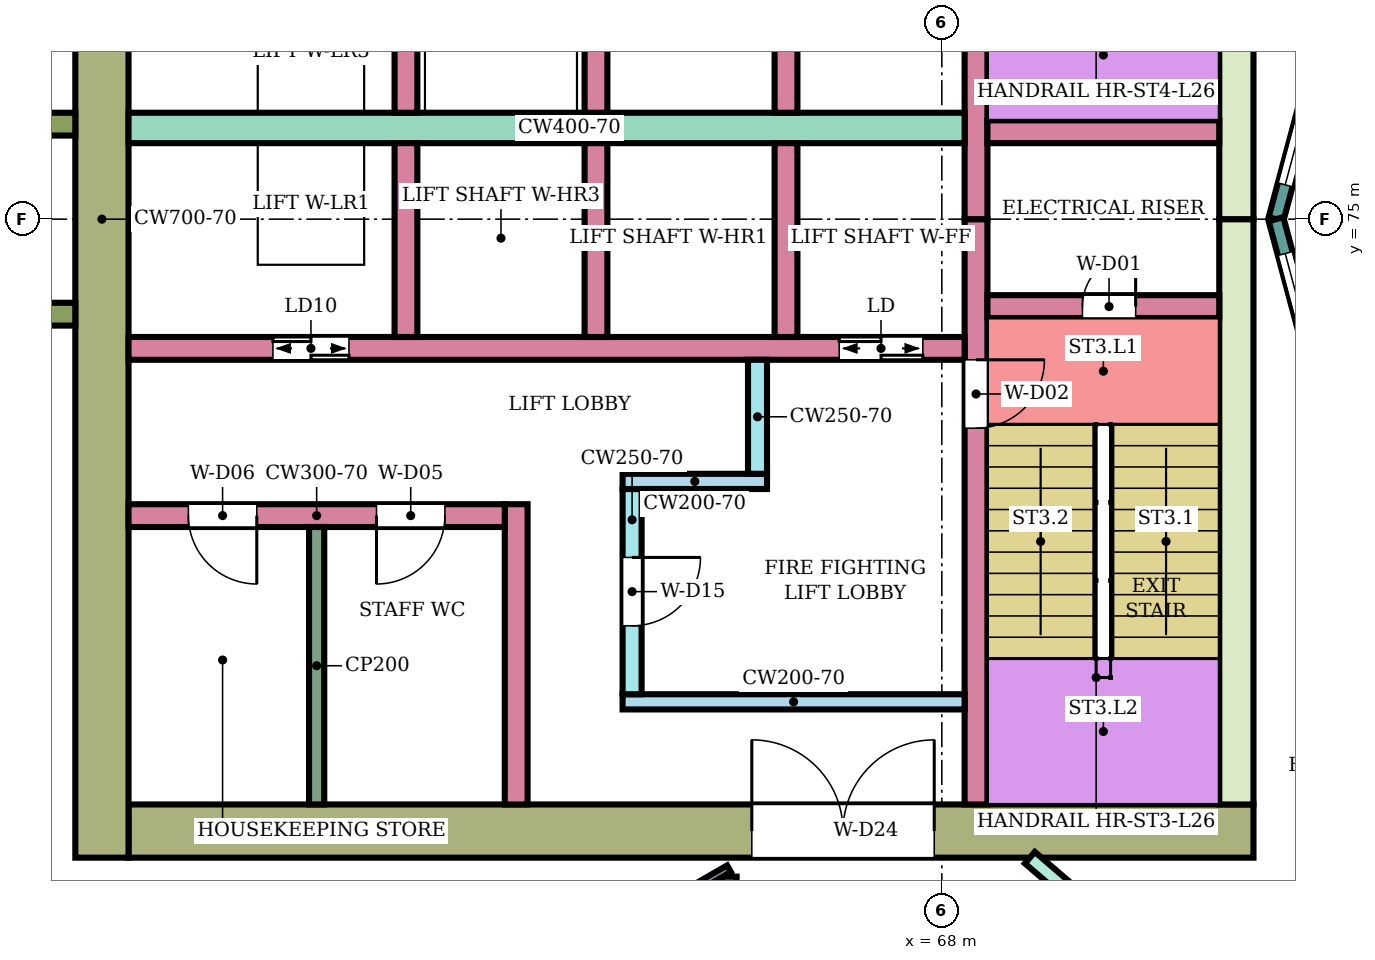
"""IFC4 building model, lengths in metres.
Left out: names, types, materials, properties, quantities, classifications, styles, units other than length and angle.
Written with IfcOpenShell. Run it as: python <this file> out.ifc"""

import sys

from ifc_helpers import new_model, si_unit, direction, frame, frame_2d, origin, place, context, subcontext, project, spatial, rectangle, extrude, element, fill, save


model = new_model("IFC4")
c1 = context("Model", 3, precision=1e-05, world=origin(), true_north=direction((0.0, 1.0)))
c2 = subcontext(c1, "Body", "Model", "MODEL_VIEW")
j1 = project(units=[si_unit("LENGTHUNIT", "METRE"), si_unit("PLANEANGLEUNIT", "RADIAN")], contexts=[c1])
p1 = place(None, origin())
s1 = spatial("IfcSite", under=j1, at=p1, CompositionType="ELEMENT")
p2 = place(p1, origin())
s2 = spatial("IfcBuilding", under=s1, at=p2, CompositionType="ELEMENT")
p3 = place(p2, frame((0.0, 0.0, 114.6)))
s3 = spatial("IfcBuildingStorey", under=s2, at=p3, CompositionType="ELEMENT", Elevation=114.6)
p4 = place(p3, frame((72.1, 66.95, 0.0), z_axis=(0.0, 0.0, 1.0), x_axis=(-1.0, 0.0, 0.0)))
e1 = element("IfcWall", 1, at=p4, inside=s3, PredefinedType="SHEAR", context=c2, shape_type="SweptSolid", body=[
    extrude(rectangle(XDim=14.8, YDim=0.7, at=frame_2d((7.4, 0.0))), origin(), (0.0, 0.0, 1.0), 3.58),
])
p5 = place(p4, frame((4.2, 0.0, 0.0)))
e2 = element("IfcOpeningElement", 2, at=p5, cuts=e1, PredefinedType="OPENING", context=c2, shape_type="SweptSolid", body=[
    extrude(rectangle(XDim=2.4, YDim=2.4, at=frame_2d((1.2, 1.2))), frame((0.0, 0.36, 0.0), z_axis=(0.0, -1.0, 0.0), x_axis=(1.0, 0.0, 0.0)), (0.0, 0.0, 1.0), 0.72),
])
for number, where, z_axis, x_axis in (
    (3, (71.875, 75.0, 0.0), (0.0, 0.0, 1.0), (0.0, -1.0, 0.0)),
    (4, (71.875, 82.7, 0.0), (0.0, 0.0, 1.0), (0.0, -1.0, 0.0)),
):
    element("IfcWall", number, at=place(p3, frame(where, z_axis=z_axis, x_axis=x_axis)), inside=s3, PredefinedType="SHEAR", context=c2, shape_type="SweptSolid", body=[
        extrude(rectangle(XDim=7.7, YDim=0.45, at=frame_2d((3.85, 0.0))), origin(), (0.0, 0.0, 1.0), 3.58),
    ])
p6 = place(p3, frame((56.95, 83.4, 0.0), z_axis=(0.0, 0.0, 1.0), x_axis=(0.0, -1.0, 0.0)))
e5 = element("IfcWall", 5, at=p6, inside=s3, PredefinedType="SHEAR", context=c2, shape_type="SweptSolid", body=[
    extrude(rectangle(XDim=16.8, YDim=0.7, at=frame_2d((8.4, 0.0))), origin(), (0.0, 0.0, 1.0), 3.58),
])
p7 = place(p3, frame((68.45, 75.0, 0.0), z_axis=(0.0, 0.0, 1.0), x_axis=(0.0, -1.0, 0.0)))
e6 = element("IfcWall", 6, at=p7, inside=s3, PredefinedType="SHEAR", context=c2, shape_type="SweptSolid", body=[
    extrude(rectangle(XDim=7.7, YDim=0.3, at=frame_2d((3.85, 0.0))), origin(), (0.0, 0.0, 1.0), 3.58),
])
p8 = place(p7, frame((1.85, 0.0, 0.0)))
e7 = element("IfcOpeningElement", 7, at=p8, cuts=e6, PredefinedType="OPENING", context=c2, shape_type="SweptSolid", body=[
    extrude(rectangle(XDim=0.9, YDim=2.1, at=frame_2d((0.45, 1.05))), frame((0.0, 0.16, 0.0), z_axis=(0.0, -1.0, 0.0), x_axis=(1.0, 0.0, 0.0)), (0.0, 0.0, 1.0), 0.32),
])
p9 = place(p3, frame((68.45, 82.7, 0.0), z_axis=(0.0, 0.0, 1.0), x_axis=(0.0, -1.0, 0.0)))
e8 = element("IfcWall", 8, at=p9, inside=s3, PredefinedType="SHEAR", context=c2, shape_type="SweptSolid", body=[
    extrude(rectangle(XDim=7.7, YDim=0.3, at=frame_2d((3.85, 0.0))), origin(), (0.0, 0.0, 1.0), 3.58),
])
p10 = place(p9, frame((0.35, 0.0, 0.0)))
e9 = element("IfcOpeningElement", 9, at=p10, cuts=e8, PredefinedType="OPENING", context=c2, shape_type="SweptSolid", body=[
    extrude(rectangle(XDim=0.9, YDim=2.1, at=frame_2d((0.45, 1.05))), frame((0.0, 0.16, 0.0), z_axis=(0.0, -1.0, 0.0), x_axis=(1.0, 0.0, 0.0)), (0.0, 0.0, 1.0), 0.32),
])
p11 = place(p3, frame((71.65, 73.85, 0.0), z_axis=(0.0, 0.0, 1.0), x_axis=(-1.0, 0.0, 0.0)))
e10 = element("IfcWall", 10, at=p11, inside=s3, PredefinedType="SHEAR", context=c2, shape_type="SweptSolid", body=[
    extrude(rectangle(XDim=3.05, YDim=0.3, at=frame_2d((1.525, 0.0))), origin(), (0.0, 0.0, 1.0), 3.58),
])
p12 = place(p11, frame((1.1, 0.0, 0.0)))
e11 = element("IfcOpeningElement", 11, at=p12, cuts=e10, PredefinedType="OPENING", context=c2, shape_type="SweptSolid", body=[
    extrude(rectangle(XDim=0.7, YDim=2.0, at=frame_2d((0.35, 1.0))), frame((0.0, 0.16, 0.0), z_axis=(0.0, -1.0, 0.0), x_axis=(1.0, 0.0, 0.0)), (0.0, 0.0, 1.0), 0.32),
])
p13 = place(p3, frame((71.65, 76.15, 0.0), z_axis=(0.0, 0.0, 1.0), x_axis=(-1.0, 0.0, 0.0)))
e12 = element("IfcWall", 12, at=p13, inside=s3, PredefinedType="SHEAR", context=c2, shape_type="SweptSolid", body=[
    extrude(rectangle(XDim=3.05, YDim=0.3, at=frame_2d((1.525, 0.0))), origin(), (0.0, 0.0, 1.0), 3.58),
])
p14 = place(p3, frame((68.3, 73.3, 0.0), z_axis=(0.0, 0.0, 1.0), x_axis=(-1.0, 0.0, 0.0)))
e13 = element("IfcWall", 13, at=p14, inside=s3, PredefinedType="SHEAR", context=c2, shape_type="SweptSolid", body=[
    extrude(rectangle(XDim=11.0, YDim=0.3, at=frame_2d((5.5, 0.0))), origin(), (0.0, 0.0, 1.0), 3.58),
])
p15 = place(p14, frame((0.55, 0.0, 0.0)))
e14 = element("IfcOpeningElement", 14, at=p15, cuts=e13, PredefinedType="OPENING", context=c2, shape_type="SweptSolid", body=[
    extrude(rectangle(XDim=1.1, YDim=2.1, at=frame_2d((0.55, 1.05))), frame((0.0, 0.16, 0.0), z_axis=(0.0, -1.0, 0.0), x_axis=(1.0, 0.0, 0.0)), (0.0, 0.0, 1.0), 0.32),
])
p16 = place(p14, frame((8.1, 0.0, 0.0)))
e15 = element("IfcOpeningElement", 15, at=p16, cuts=e13, PredefinedType="OPENING", context=c2, shape_type="SweptSolid", body=[
    extrude(rectangle(XDim=1.0, YDim=2.1, at=frame_2d((0.5, 1.05))), frame((0.0, 0.16, 0.0), z_axis=(0.0, -1.0, 0.0), x_axis=(1.0, 0.0, 0.0)), (0.0, 0.0, 1.0), 0.32),
])
p17 = place(p3, frame((68.3, 76.2, 0.0), z_axis=(0.0, 0.0, 1.0), x_axis=(-1.0, 0.0, 0.0)))
e16 = element("IfcWall", 16, at=p17, inside=s3, PredefinedType="SHEAR", context=c2, shape_type="SweptSolid", body=[
    extrude(rectangle(XDim=11.0, YDim=0.4, at=frame_2d((5.5, 0.0))), origin(), (0.0, 0.0, 1.0), 3.58),
])
for number, where, z_axis, x_axis in (
    (17, (65.95, 76.0, 0.0), (0.0, 0.0, 1.0), (0.0, -1.0, 0.0)),
    (18, (63.45, 76.0, 0.0), (0.0, 0.0, 1.0), (0.0, -1.0, 0.0)),
    (19, (60.95, 76.0, 0.0), (0.0, 0.0, 1.0), (0.0, -1.0, 0.0)),
    (20, (65.95, 78.95, 0.0), (0.0, 0.0, 1.0), (0.0, -1.0, 0.0)),
    (21, (63.45, 78.95, 0.0), (0.0, 0.0, 1.0), (0.0, -1.0, 0.0)),
    (22, (60.95, 78.95, 0.0), (0.0, 0.0, 1.0), (0.0, -1.0, 0.0)),
):
    element("IfcWall", number, at=place(p3, frame(where, z_axis=z_axis, x_axis=x_axis)), inside=s3, PredefinedType="SHEAR", context=c2, shape_type="SweptSolid", body=[
        extrude(rectangle(XDim=2.55, YDim=0.3, at=frame_2d((1.275, 0.0))), origin(), (0.0, 0.0, 1.0), 3.58),
    ])
p18 = place(p3, frame((68.3, 68.65, 0.0), z_axis=(0.0, 0.0, 1.0), x_axis=(-1.0, 0.0, 0.0)))
e23 = element("IfcWall", 23, at=p18, inside=s3, PredefinedType="SHEAR", context=c2, shape_type="SweptSolid", body=[
    extrude(rectangle(XDim=4.5, YDim=0.2, at=frame_2d((2.25, 0.0))), origin(), (0.0, 0.0, 1.0), 3.58),
])
p19 = place(p3, frame((63.925, 71.45, 0.0), z_axis=(0.0, 0.0, 1.0), x_axis=(0.0, -1.0, 0.0)))
e24 = element("IfcWall", 24, at=p19, inside=s3, PredefinedType="SHEAR", context=c2, shape_type="SweptSolid", body=[
    extrude(rectangle(XDim=2.7, YDim=0.25, at=frame_2d((1.35, 0.0))), origin(), (0.0, 0.0, 1.0), 3.58),
])
p20 = place(p19, frame((0.9, 0.0, 0.0)))
e25 = element("IfcOpeningElement", 25, at=p20, cuts=e24, PredefinedType="OPENING", context=c2, shape_type="SweptSolid", body=[
    extrude(rectangle(XDim=0.9, YDim=2.1, at=frame_2d((0.45, 1.05))), frame((0.0, 0.135, 0.0), z_axis=(0.0, -1.0, 0.0), x_axis=(1.0, 0.0, 0.0)), (0.0, 0.0, 1.0), 0.27),
])
p21 = place(p3, frame((65.7, 71.55, 0.0), z_axis=(0.0, 0.0, 1.0), x_axis=(-1.0, 0.0, 0.0)))
e26 = element("IfcWall", 26, at=p21, inside=s3, PredefinedType="SHEAR", context=c2, shape_type="SweptSolid", body=[
    extrude(rectangle(XDim=1.9, YDim=0.2, at=frame_2d((0.95, 0.0))), origin(), (0.0, 0.0, 1.0), 3.58),
])
p22 = place(p3, frame((65.575, 73.15, 0.0), z_axis=(0.0, 0.0, 1.0), x_axis=(0.0, -1.0, 0.0)))
e27 = element("IfcWall", 27, at=p22, inside=s3, PredefinedType="SHEAR", context=c2, shape_type="SweptSolid", body=[
    extrude(rectangle(XDim=1.5, YDim=0.25, at=frame_2d((0.75, 0.0))), origin(), (0.0, 0.0, 1.0), 3.58),
])
p23 = place(p3, frame((62.4, 71.25, 0.0), z_axis=(0.0, 0.0, 1.0), x_axis=(0.0, -1.0, 0.0)))
e28 = element("IfcWall", 28, at=p23, inside=s3, PredefinedType="SHEAR", context=c2, shape_type="SweptSolid", body=[
    extrude(rectangle(XDim=3.95, YDim=0.3, at=frame_2d((1.975, 0.0))), origin(), (0.0, 0.0, 1.0), 3.58),
])
p24 = place(p3, frame((62.25, 71.1, 0.0), z_axis=(0.0, 0.0, 1.0), x_axis=(-1.0, 0.0, 0.0)))
e29 = element("IfcWall", 29, at=p24, inside=s3, PredefinedType="SHEAR", context=c2, shape_type="SweptSolid", body=[
    extrude(rectangle(XDim=4.95, YDim=0.3, at=frame_2d((2.475, 0.0))), origin(), (0.0, 0.0, 1.0), 3.58),
])
p25 = place(p24, frame((0.788, 0.0, 0.0)))
e30 = element("IfcOpeningElement", 30, at=p25, cuts=e29, PredefinedType="OPENING", context=c2, shape_type="SweptSolid", body=[
    extrude(rectangle(XDim=0.9, YDim=2.1, at=frame_2d((0.45, 1.05))), frame((0.0, 0.16, 0.0), z_axis=(0.0, -1.0, 0.0), x_axis=(1.0, 0.0, 0.0)), (0.0, 0.0, 1.0), 0.32),
])
p26 = place(p24, frame((3.262, 0.0, 0.0)))
e31 = element("IfcOpeningElement", 31, at=p26, cuts=e29, PredefinedType="OPENING", context=c2, shape_type="SweptSolid", body=[
    extrude(rectangle(XDim=0.9, YDim=2.1, at=frame_2d((0.45, 1.05))), frame((0.0, 0.16, 0.0), z_axis=(0.0, -1.0, 0.0), x_axis=(1.0, 0.0, 0.0)), (0.0, 0.0, 1.0), 0.32),
])
for number, where, z_axis, x_axis in (
    (32, (56.6, 76.25, 0.0), (0.0, 0.0, 1.0), (-1.0, 0.0, 0.0)),
    (33, (56.6, 73.75, 0.0), (0.0, 0.0, 1.0), (-1.0, 0.0, 0.0)),
):
    element("IfcWall", number, at=place(p3, frame(where, z_axis=z_axis, x_axis=x_axis)), inside=s3, PredefinedType="NOTDEFINED", context=c2, shape_type="SweptSolid", body=[
        extrude(rectangle(XDim=2.416, YDim=0.3, at=frame_2d((1.208, 0.0))), origin(), (0.0, 0.0, 1.0), 3.9),
    ])
p27 = place(p3, frame((73.415, 78.802, 0.0), z_axis=(0.0, 0.0, 1.0), x_axis=(-0.258789828301, -0.965933654434, 0.0)))
e34 = element("IfcWall", 34, at=p27, inside=s3, PredefinedType="NOTDEFINED", context=c2, shape_type="SweptSolid", body=[
    extrude(rectangle(XDim=3.936, YDim=0.2, at=frame_2d((1.968, 0.0))), origin(), (0.0, 0.0, 1.0), 3.9),
])
p28 = place(p27, frame((0.468, 0.0, 0.9)))
e35 = element("IfcOpeningElement", 35, at=p28, cuts=e34, PredefinedType="OPENING", context=c2, shape_type="SweptSolid", body=[
    extrude(rectangle(XDim=3.0, YDim=2.3, at=frame_2d((1.5, 1.15))), frame((0.0, 0.11, 0.0), z_axis=(0.0, -1.0, 0.0), x_axis=(1.0, 0.0, 0.0)), (0.0, 0.0, 1.0), 0.22),
])
p29 = place(p3, frame((72.396, 75.0, 0.0), z_axis=(0.0, 0.0, 1.0), x_axis=(0.258789828301, -0.965933654434, 0.0)))
e36 = element("IfcWall", 36, at=p29, inside=s3, PredefinedType="NOTDEFINED", context=c2, shape_type="SweptSolid", body=[
    extrude(rectangle(XDim=3.936, YDim=0.2, at=frame_2d((1.968, 0.0))), origin(), (0.0, 0.0, 1.0), 3.9),
])
p30 = place(p29, frame((0.468, 0.0, 0.9)))
e37 = element("IfcOpeningElement", 37, at=p30, cuts=e36, PredefinedType="OPENING", context=c2, shape_type="SweptSolid", body=[
    extrude(rectangle(XDim=3.0, YDim=2.3, at=frame_2d((1.5, 1.15))), frame((0.0, 0.11, 0.0), z_axis=(0.0, -1.0, 0.0), x_axis=(1.0, 0.0, 0.0)), (0.0, 0.0, 1.0), 0.22),
])
p31 = place(p3, frame((65.2, 65.2, 0.0), z_axis=(0.0, 0.0, 1.0), x_axis=(0.0, 1.0, 0.0)))
e38 = element("IfcWall", 38, at=p31, inside=s3, PredefinedType="PARTITIONING", context=c2, shape_type="SweptSolid", body=[
    extrude(rectangle(XDim=1.15, YDim=0.2, at=frame_2d((0.575, 0.0))), origin(), (0.0, 0.0, 1.0), 3.45),
])
p32 = place(p3, frame((69.158, 66.6, 0.0), z_axis=(0.0, 0.0, 1.0), x_axis=(0.758063092745, -0.652181222835, 0.0)))
e39 = element("IfcWall", 39, at=p32, inside=s3, PredefinedType="PARTITIONING", context=c2, shape_type="SweptSolid", body=[
    extrude(rectangle(XDim=5.16, YDim=0.2, at=frame_2d((2.58, 0.0))), origin(), (0.0, 0.0, 1.0), 3.45),
])
p33 = place(p32, frame((2.165, 0.0, 0.0)))
e40 = element("IfcOpeningElement", 40, at=p33, cuts=e39, PredefinedType="OPENING", context=c2, shape_type="SweptSolid", body=[
    extrude(rectangle(XDim=0.9, YDim=2.1, at=frame_2d((0.45, 1.05))), frame((0.0, 0.11, 0.0), z_axis=(0.0, -1.0, 0.0), x_axis=(1.0, 0.0, 0.0)), (0.0, 0.0, 1.0), 0.22),
])
p34 = place(p3, frame((57.659, 62.101, 0.0), z_axis=(0.0, 0.0, 1.0), x_axis=(0.86602264145, 0.500004784474, 0.0)))
e41 = element("IfcWall", 41, at=p34, inside=s3, PredefinedType="PARTITIONING", context=c2, shape_type="SweptSolid", body=[
    extrude(rectangle(XDim=8.708, YDim=0.1, at=frame_2d((4.354, 0.0))), origin(), (0.0, 0.0, 1.0), 3.45),
])
p35 = place(p34, frame((3.929, 0.0, 0.0)))
e42 = element("IfcOpeningElement", 42, at=p35, cuts=e41, PredefinedType="OPENING", context=c2, shape_type="SweptSolid", body=[
    extrude(rectangle(XDim=0.9, YDim=2.1, at=frame_2d((0.45, 1.05))), frame((0.0, 0.06, 0.0), z_axis=(0.0, -1.0, 0.0), x_axis=(1.0, 0.0, 0.0)), (0.0, 0.0, 1.0), 0.12),
])
p36 = place(p3, frame((59.775, 70.95, 0.0), z_axis=(0.0, 0.0, 1.0), x_axis=(0.0, -1.0, 0.0)))
e43 = element("IfcWall", 43, at=p36, inside=s3, PredefinedType="PARTITIONING", context=c2, shape_type="SweptSolid", body=[
    extrude(rectangle(XDim=3.65, YDim=0.2, at=frame_2d((1.825, 0.0))), origin(), (0.0, 0.0, 1.0), 3.58),
])
p37 = place(p28, origin())
e44 = element("IfcWindow", 44, at=p37, inside=s3, PartitioningType="SINGLE_PANEL", PredefinedType="WINDOW", context=c2, shape_type="SweptSolid", body=[
    extrude(rectangle(XDim=3.0, YDim=2.3, at=frame_2d((1.5, 1.15))), frame((0.0, 0.03, 0.0), z_axis=(0.0, -1.0, 0.0), x_axis=(1.0, 0.0, 0.0)), (0.0, 0.0, 1.0), 0.06),
])
fill(e35, e44)
p38 = place(p30, origin())
e45 = element("IfcWindow", 45, at=p38, inside=s3, PartitioningType="SINGLE_PANEL", PredefinedType="WINDOW", context=c2, shape_type="SweptSolid", body=[
    extrude(rectangle(XDim=3.0, YDim=2.3, at=frame_2d((1.5, 1.15))), frame((0.0, 0.03, 0.0), z_axis=(0.0, -1.0, 0.0), x_axis=(1.0, 0.0, 0.0)), (0.0, 0.0, 1.0), 0.06),
])
fill(e37, e45)
p39 = place(p12, frame((0.7, 0.0, 0.0), z_axis=(0.0, 0.0, 1.0), x_axis=(-1.0, 0.0, 0.0)))
e46 = element("IfcDoor", 46, at=p39, inside=s3, OperationType="SINGLE_SWING_RIGHT", PredefinedType="DOOR", context=c2, shape_type="SweptSolid", body=[
    extrude(rectangle(XDim=0.7, YDim=2.0, at=frame_2d((0.35, 1.0))), frame((0.0, 0.025, 0.0), z_axis=(0.0, -1.0, 0.0), x_axis=(1.0, 0.0, 0.0)), (0.0, 0.0, 1.0), 0.05),
])
fill(e11, e46)
p40 = place(p8, origin())
e47 = element("IfcDoor", 47, at=p40, inside=s3, OperationType="SINGLE_SWING_LEFT", PredefinedType="DOOR", context=c2, shape_type="SweptSolid", body=[
    extrude(rectangle(XDim=0.9, YDim=2.1, at=frame_2d((0.45, 1.05))), frame((0.0, 0.025, 0.0), z_axis=(0.0, -1.0, 0.0), x_axis=(1.0, 0.0, 0.0)), (0.0, 0.0, 1.0), 0.05),
])
fill(e7, e47)
p41 = place(p15, origin())
e48 = element("IfcDoor", 48, at=p41, inside=s3, OperationType="DOUBLE_DOOR_SLIDING", PredefinedType="DOOR", context=c2, shape_type="SweptSolid", body=[
    extrude(rectangle(XDim=1.1, YDim=2.1, at=frame_2d((0.55, 1.05))), frame((0.0, 0.025, 0.0), z_axis=(0.0, -1.0, 0.0), x_axis=(1.0, 0.0, 0.0)), (0.0, 0.0, 1.0), 0.05),
])
fill(e14, e48)
p42 = place(p16, origin())
e49 = element("IfcDoor", 49, at=p42, inside=s3, OperationType="DOUBLE_DOOR_SLIDING", PredefinedType="DOOR", context=c2, shape_type="SweptSolid", body=[
    extrude(rectangle(XDim=1.0, YDim=2.1, at=frame_2d((0.5, 1.05))), frame((0.0, 0.025, 0.0), z_axis=(0.0, -1.0, 0.0), x_axis=(1.0, 0.0, 0.0)), (0.0, 0.0, 1.0), 0.05),
])
fill(e15, e49)
p43 = place(p20, origin())
e50 = element("IfcDoor", 50, at=p43, inside=s3, OperationType="SINGLE_SWING_LEFT", PredefinedType="DOOR", context=c2, shape_type="SweptSolid", body=[
    extrude(rectangle(XDim=0.9, YDim=2.1, at=frame_2d((0.45, 1.05))), frame((0.0, 0.025, 0.0), z_axis=(0.0, -1.0, 0.0), x_axis=(1.0, 0.0, 0.0)), (0.0, 0.0, 1.0), 0.05),
])
fill(e25, e50)
p44 = place(p25, origin())
e51 = element("IfcDoor", 51, at=p44, inside=s3, OperationType="SINGLE_SWING_RIGHT", PredefinedType="DOOR", context=c2, shape_type="SweptSolid", body=[
    extrude(rectangle(XDim=0.9, YDim=2.1, at=frame_2d((0.45, 1.05))), frame((0.0, 0.025, 0.0), z_axis=(0.0, -1.0, 0.0), x_axis=(1.0, 0.0, 0.0)), (0.0, 0.0, 1.0), 0.05),
])
fill(e30, e51)
p45 = place(p26, origin())
e52 = element("IfcDoor", 52, at=p45, inside=s3, OperationType="SINGLE_SWING_LEFT", PredefinedType="DOOR", context=c2, shape_type="SweptSolid", body=[
    extrude(rectangle(XDim=0.9, YDim=2.1, at=frame_2d((0.45, 1.05))), frame((0.0, 0.025, 0.0), z_axis=(0.0, -1.0, 0.0), x_axis=(1.0, 0.0, 0.0)), (0.0, 0.0, 1.0), 0.05),
])
fill(e31, e52)
p46 = place(p5, frame((2.4, 0.0, 0.0), z_axis=(0.0, 0.0, 1.0), x_axis=(-1.0, 0.0, 0.0)))
e53 = element("IfcDoor", 53, at=p46, inside=s3, OperationType="DOUBLE_DOOR_SINGLE_SWING", PredefinedType="DOOR", context=c2, shape_type="SweptSolid", body=[
    extrude(rectangle(XDim=2.4, YDim=2.4, at=frame_2d((1.2, 1.2))), frame((0.0, 0.025, 0.0), z_axis=(0.0, -1.0, 0.0), x_axis=(1.0, 0.0, 0.0)), (0.0, 0.0, 1.0), 0.05),
])
fill(e2, e53)
save(model, sys.argv[1])
